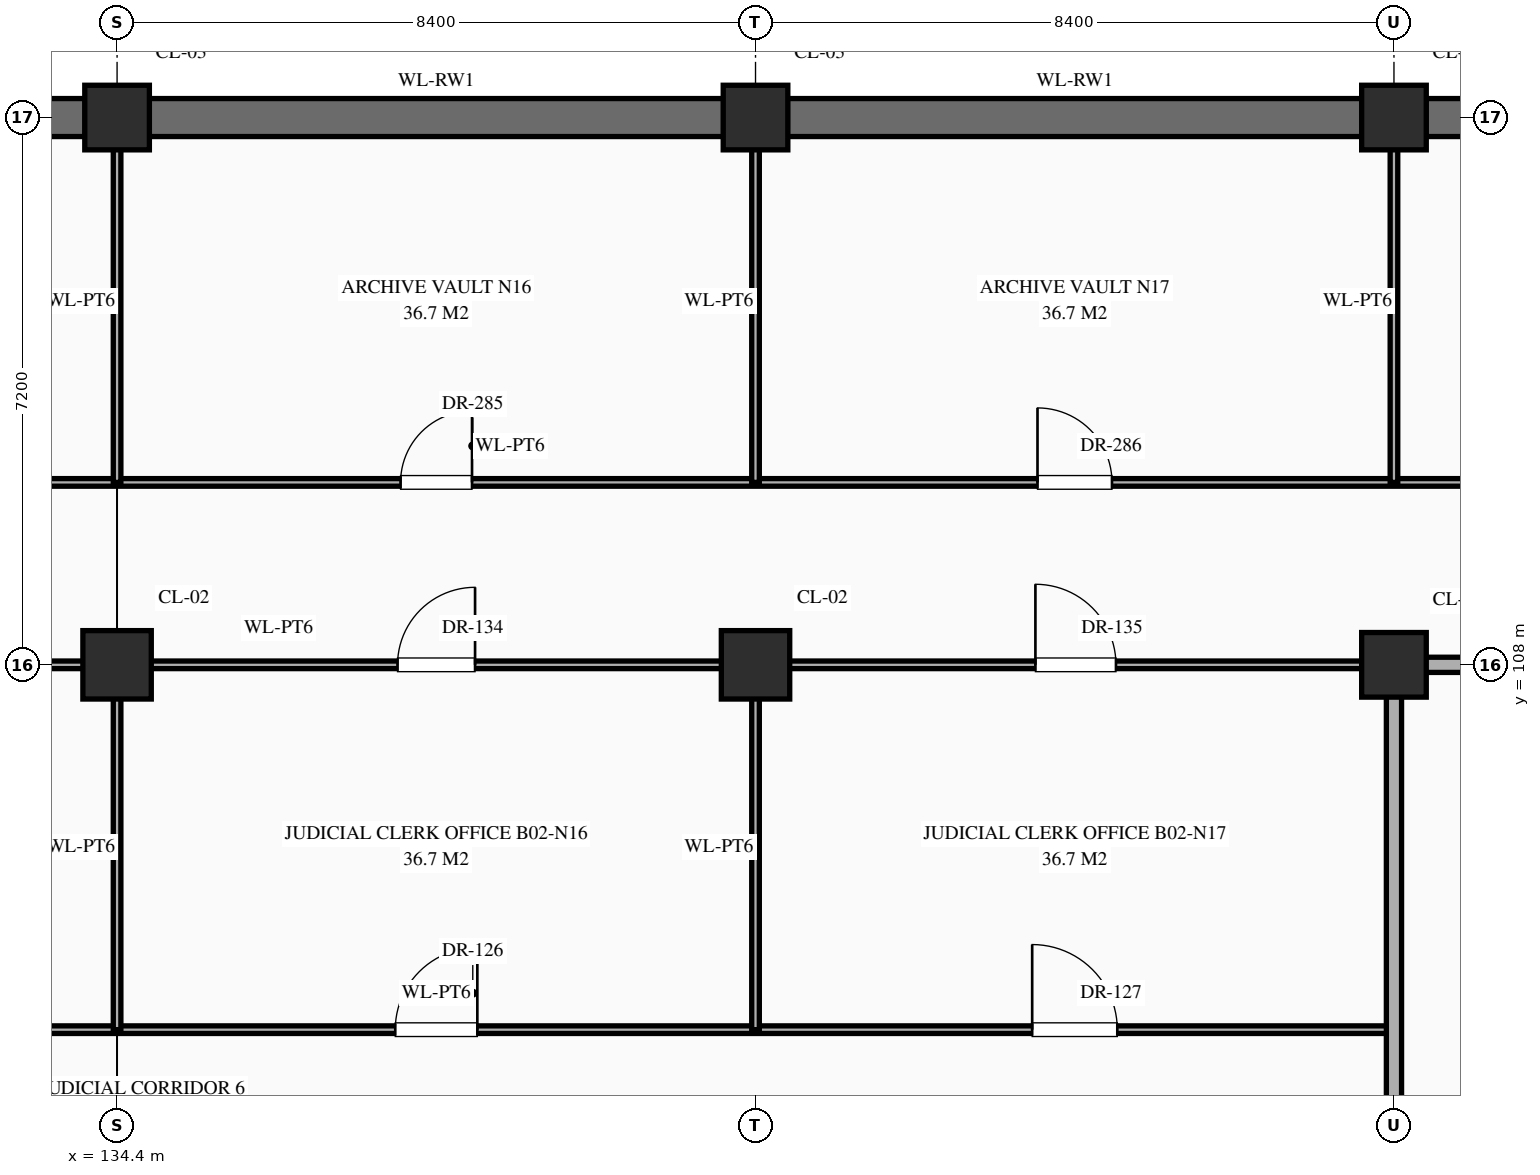
"""IFC4 building model, lengths in metres.
Left out: names, types, materials, properties, quantities, classifications, styles, units other than length and angle.
Written with IfcOpenShell. Run it as: python <this file> out.ifc"""

import sys

from ifc_helpers import new_model, si_unit, direction, frame, frame_2d, origin, origin_2d, place, context, subcontext, project, spatial, rectangle, extrude, element, fill, save


model = new_model("IFC4")
c1 = context("Model", 3, precision=1e-05, world=origin(), true_north=direction((0.0, 1.0)))
c2 = subcontext(c1, "Body", "Model", "MODEL_VIEW")
j1 = project(units=[si_unit("LENGTHUNIT", "METRE"), si_unit("PLANEANGLEUNIT", "RADIAN")], contexts=[c1])
p1 = place(None, origin())
s1 = spatial("IfcSite", under=j1, at=p1, CompositionType="ELEMENT")
p2 = place(p1, origin())
s2 = spatial("IfcBuilding", under=s1, at=p2, CompositionType="ELEMENT")
p3 = place(p2, frame((0.0, 0.0, -10.2)))
s3 = spatial("IfcBuildingStorey", under=s2, at=p3, CompositionType="ELEMENT", Elevation=-10.2)
p4 = place(p3, frame((134.4, 108.0, 0.0), z_axis=(0.0, 0.0, 1.0), x_axis=(1.0, 0.0, 0.0)))
e1 = element("IfcColumn", 1, at=p4, inside=s3, PredefinedType="COLUMN", context=c2, shape_type="SweptSolid", body=[
    extrude(rectangle(XDim=0.9, YDim=0.9, at=origin_2d()), origin(), (0.0, 0.0, 1.0), 4.8),
])
p5 = place(p3, frame((134.4, 115.2, 0.0), z_axis=(0.0, 0.0, 1.0), x_axis=(1.0, 0.0, 0.0)))
e2 = element("IfcColumn", 2, at=p5, inside=s3, PredefinedType="COLUMN", context=c2, shape_type="SweptSolid", body=[
    extrude(rectangle(XDim=0.85, YDim=0.85, at=origin_2d()), origin(), (0.0, 0.0, 1.0), 4.8),
])
p6 = place(p3, frame((142.8, 108.0, 0.0), z_axis=(0.0, 0.0, 1.0), x_axis=(1.0, 0.0, 0.0)))
e3 = element("IfcColumn", 3, at=p6, inside=s3, PredefinedType="COLUMN", context=c2, shape_type="SweptSolid", body=[
    extrude(rectangle(XDim=0.9, YDim=0.9, at=origin_2d()), origin(), (0.0, 0.0, 1.0), 4.8),
])
for number, where, z_axis, x_axis in (
    (4, (142.8, 115.2, 0.0), (0.0, 0.0, 1.0), (1.0, 0.0, 0.0)),
    (5, (151.2, 108.0, 0.0), (0.0, 0.0, 1.0), (1.0, 0.0, 0.0)),
    (6, (151.2, 115.2, 0.0), (0.0, 0.0, 1.0), (1.0, 0.0, 0.0)),
):
    element("IfcColumn", number, at=place(p3, frame(where, z_axis=z_axis, x_axis=x_axis)), inside=s3, PredefinedType="COLUMN", context=c2, shape_type="SweptSolid", body=[
        extrude(rectangle(XDim=0.85, YDim=0.85, at=origin_2d()), origin(), (0.0, 0.0, 1.0), 4.8),
    ])
p7 = place(p3, frame((126.42, 115.2, 0.0), z_axis=(0.0, 0.0, 1.0), x_axis=(1.0, 0.0, 0.0)))
e7 = element("IfcWall", 7, at=p7, inside=s3, PredefinedType="USERDEFINED", context=c2, shape_type="SweptSolid", body=[
    extrude(rectangle(XDim=7.56, YDim=0.5, at=frame_2d((3.78, 0.0))), origin(), (0.0, 0.0, 1.0), 4.48),
])
p8 = place(p3, frame((134.82, 115.2, 0.0), z_axis=(0.0, 0.0, 1.0), x_axis=(1.0, 0.0, 0.0)))
e8 = element("IfcWall", 8, at=p8, inside=s3, PredefinedType="USERDEFINED", context=c2, shape_type="SweptSolid", body=[
    extrude(rectangle(XDim=7.56, YDim=0.5, at=frame_2d((3.78, 0.0))), origin(), (0.0, 0.0, 1.0), 4.48),
])
p9 = place(p3, frame((143.22, 115.2, 0.0), z_axis=(0.0, 0.0, 1.0), x_axis=(1.0, 0.0, 0.0)))
e9 = element("IfcWall", 9, at=p9, inside=s3, PredefinedType="USERDEFINED", context=c2, shape_type="SweptSolid", body=[
    extrude(rectangle(XDim=7.56, YDim=0.5, at=frame_2d((3.78, 0.0))), origin(), (0.0, 0.0, 1.0), 4.48),
])
p10 = place(p3, frame((151.62, 115.2, 0.0), z_axis=(0.0, 0.0, 1.0), x_axis=(1.0, 0.0, 0.0)))
e10 = element("IfcWall", 10, at=p10, inside=s3, PredefinedType="USERDEFINED", context=c2, shape_type="SweptSolid", body=[
    extrude(rectangle(XDim=7.56, YDim=0.5, at=frame_2d((3.78, 0.0))), origin(), (0.0, 0.0, 1.0), 4.48),
])
p11 = place(p3, frame((126.0, 103.2, 0.0), z_axis=(0.0, 0.0, 1.0), x_axis=(1.0, 0.0, 0.0)))
e11 = element("IfcWall", 11, at=p11, inside=s3, PredefinedType="STANDARD", context=c2, shape_type="SweptSolid", body=[
    extrude(rectangle(XDim=25.2, YDim=0.1, at=frame_2d((12.6, 0.0))), origin(), (0.0, 0.0, 1.0), 4.48),
])
p12 = place(p11, frame((3.68, 0.0, 0.0)))
e12 = element("IfcOpeningElement", 12, at=p12, cuts=e11, PredefinedType="OPENING", context=c2, shape_type="SweptSolid", body=[
    extrude(rectangle(XDim=1.04, YDim=2.2, at=frame_2d((0.52, 1.1))), frame((0.0, 0.062, 0.0), z_axis=(0.0, -1.0, 0.0), x_axis=(1.0, 0.0, 0.0)), (0.0, 0.0, 1.0), 0.124),
])
p13 = place(p11, frame((12.06, 0.0, 0.0)))
e13 = element("IfcOpeningElement", 13, at=p13, cuts=e11, PredefinedType="OPENING", context=c2, shape_type="SweptSolid", body=[
    extrude(rectangle(XDim=1.08, YDim=2.25, at=frame_2d((0.54, 1.125))), frame((0.0, 0.062, 0.0), z_axis=(0.0, -1.0, 0.0), x_axis=(1.0, 0.0, 0.0)), (0.0, 0.0, 1.0), 0.124),
])
p14 = place(p11, frame((20.44, 0.0, 0.0)))
e14 = element("IfcOpeningElement", 14, at=p14, cuts=e11, PredefinedType="OPENING", context=c2, shape_type="SweptSolid", body=[
    extrude(rectangle(XDim=1.12, YDim=2.25, at=frame_2d((0.56, 1.125))), frame((0.0, 0.062, 0.0), z_axis=(0.0, -1.0, 0.0), x_axis=(1.0, 0.0, 0.0)), (0.0, 0.0, 1.0), 0.124),
])
p15 = place(p3, frame((126.0, 108.0, 0.0), z_axis=(0.0, 0.0, 1.0), x_axis=(1.0, 0.0, 0.0)))
e15 = element("IfcWall", 15, at=p15, inside=s3, PredefinedType="STANDARD", context=c2, shape_type="SweptSolid", body=[
    extrude(rectangle(XDim=25.2, YDim=0.1, at=frame_2d((12.6, 0.0))), origin(), (0.0, 0.0, 1.0), 3.63),
])
p16 = place(p15, frame((3.71, 0.0, 0.0)))
e16 = element("IfcOpeningElement", 16, at=p16, cuts=e15, PredefinedType="OPENING", context=c2, shape_type="SweptSolid", body=[
    extrude(rectangle(XDim=0.98, YDim=2.35, at=frame_2d((0.49, 1.175))), frame((0.0, 0.062, 0.0), z_axis=(0.0, -1.0, 0.0), x_axis=(1.0, 0.0, 0.0)), (0.0, 0.0, 1.0), 0.124),
])
p17 = place(p15, frame((12.09, 0.0, 0.0)))
e17 = element("IfcOpeningElement", 17, at=p17, cuts=e15, PredefinedType="OPENING", context=c2, shape_type="SweptSolid", body=[
    extrude(rectangle(XDim=1.02, YDim=2.4, at=frame_2d((0.51, 1.2))), frame((0.0, 0.062, 0.0), z_axis=(0.0, -1.0, 0.0), x_axis=(1.0, 0.0, 0.0)), (0.0, 0.0, 1.0), 0.124),
])
p18 = place(p15, frame((20.482, 0.0, 0.0)))
e18 = element("IfcOpeningElement", 18, at=p18, cuts=e15, PredefinedType="OPENING", context=c2, shape_type="SweptSolid", body=[
    extrude(rectangle(XDim=1.06, YDim=2.4, at=frame_2d((0.53, 1.2))), frame((0.0, 0.062, 0.0), z_axis=(0.0, -1.0, 0.0), x_axis=(1.0, 0.0, 0.0)), (0.0, 0.0, 1.0), 0.124),
])
p19 = place(p3, frame((151.2, 108.0, 0.0), z_axis=(0.0, 0.0, 1.0), x_axis=(1.0, 0.0, 0.0)))
e19 = element("IfcWall", 19, at=p19, inside=s3, PredefinedType="STANDARD", context=c2, shape_type="SweptSolid", body=[
    extrude(rectangle(XDim=6.6, YDim=0.2, at=frame_2d((3.3, 0.0))), origin(), (0.0, 0.0, 1.0), 3.63),
])
p20 = place(p3, frame((0.04, 110.4, 0.0), z_axis=(0.0, 0.0, 1.0), x_axis=(1.0, 0.0, 0.0)))
e20 = element("IfcWall", 20, at=p20, inside=s3, PredefinedType="STANDARD", context=c2, shape_type="SweptSolid", body=[
    extrude(rectangle(XDim=167.92, YDim=0.1, at=frame_2d((83.96, 0.0))), origin(), (0.0, 0.0, 1.0), 4.48),
])
p21 = place(p20, frame((3.54, 0.0, 0.0)))
e21 = element("IfcOpeningElement", 21, at=p21, cuts=e20, PredefinedType="OPENING", context=c2, shape_type="SweptSolid", body=[
    extrude(rectangle(XDim=1.28, YDim=2.35, at=frame_2d((0.64, 1.175))), frame((0.0, 0.062, 0.0), z_axis=(0.0, -1.0, 0.0), x_axis=(1.0, 0.0, 0.0)), (0.0, 0.0, 1.0), 0.124),
])
p22 = place(p20, frame((12.09, 0.0, 0.0)))
e22 = element("IfcOpeningElement", 22, at=p22, cuts=e20, PredefinedType="OPENING", context=c2, shape_type="SweptSolid", body=[
    extrude(rectangle(XDim=0.94, YDim=2.3, at=frame_2d((0.47, 1.15))), frame((0.0, 0.062, 0.0), z_axis=(0.0, -1.0, 0.0), x_axis=(1.0, 0.0, 0.0)), (0.0, 0.0, 1.0), 0.124),
])
p23 = place(p20, frame((20.47, 0.0, 0.0)))
e23 = element("IfcOpeningElement", 23, at=p23, cuts=e20, PredefinedType="OPENING", context=c2, shape_type="SweptSolid", body=[
    extrude(rectangle(XDim=0.98, YDim=2.35, at=frame_2d((0.49, 1.175))), frame((0.0, 0.062, 0.0), z_axis=(0.0, -1.0, 0.0), x_axis=(1.0, 0.0, 0.0)), (0.0, 0.0, 1.0), 0.124),
])
p24 = place(p20, frame((28.85, 0.0, 0.0)))
e24 = element("IfcOpeningElement", 24, at=p24, cuts=e20, PredefinedType="OPENING", context=c2, shape_type="SweptSolid", body=[
    extrude(rectangle(XDim=1.02, YDim=2.4, at=frame_2d((0.51, 1.2))), frame((0.0, 0.062, 0.0), z_axis=(0.0, -1.0, 0.0), x_axis=(1.0, 0.0, 0.0)), (0.0, 0.0, 1.0), 0.124),
])
p25 = place(p20, frame((37.23, 0.0, 0.0)))
e25 = element("IfcOpeningElement", 25, at=p25, cuts=e20, PredefinedType="OPENING", context=c2, shape_type="SweptSolid", body=[
    extrude(rectangle(XDim=1.06, YDim=2.4, at=frame_2d((0.53, 1.2))), frame((0.0, 0.062, 0.0), z_axis=(0.0, -1.0, 0.0), x_axis=(1.0, 0.0, 0.0)), (0.0, 0.0, 1.0), 0.124),
])
p26 = place(p20, frame((45.59, 0.0, 0.0)))
e26 = element("IfcOpeningElement", 26, at=p26, cuts=e20, PredefinedType="OPENING", context=c2, shape_type="SweptSolid", body=[
    extrude(rectangle(XDim=1.14, YDim=2.4, at=frame_2d((0.57, 1.2))), frame((0.0, 0.062, 0.0), z_axis=(0.0, -1.0, 0.0), x_axis=(1.0, 0.0, 0.0)), (0.0, 0.0, 1.0), 0.124),
])
p27 = place(p20, frame((54.13, 0.0, 0.0)))
e27 = element("IfcOpeningElement", 27, at=p27, cuts=e20, PredefinedType="OPENING", context=c2, shape_type="SweptSolid", body=[
    extrude(rectangle(XDim=0.86, YDim=2.1, at=frame_2d((0.43, 1.05))), frame((0.0, 0.062, 0.0), z_axis=(0.0, -1.0, 0.0), x_axis=(1.0, 0.0, 0.0)), (0.0, 0.0, 1.0), 0.124),
])
p28 = place(p20, frame((62.5, 0.0, 0.0)))
e28 = element("IfcOpeningElement", 28, at=p28, cuts=e20, PredefinedType="OPENING", context=c2, shape_type="SweptSolid", body=[
    extrude(rectangle(XDim=0.92, YDim=2.15, at=frame_2d((0.46, 1.075))), frame((0.0, 0.062, 0.0), z_axis=(0.0, -1.0, 0.0), x_axis=(1.0, 0.0, 0.0)), (0.0, 0.0, 1.0), 0.124),
])
p29 = place(p20, frame((70.88, 0.0, 0.0)))
e29 = element("IfcOpeningElement", 29, at=p29, cuts=e20, PredefinedType="OPENING", context=c2, shape_type="SweptSolid", body=[
    extrude(rectangle(XDim=0.96, YDim=2.2, at=frame_2d((0.48, 1.1))), frame((0.0, 0.062, 0.0), z_axis=(0.0, -1.0, 0.0), x_axis=(1.0, 0.0, 0.0)), (0.0, 0.0, 1.0), 0.124),
])
p30 = place(p20, frame((79.26, 0.0, 0.0)))
e30 = element("IfcOpeningElement", 30, at=p30, cuts=e20, PredefinedType="OPENING", context=c2, shape_type="SweptSolid", body=[
    extrude(rectangle(XDim=1.0, YDim=2.25, at=frame_2d((0.5, 1.125))), frame((0.0, 0.062, 0.0), z_axis=(0.0, -1.0, 0.0), x_axis=(1.0, 0.0, 0.0)), (0.0, 0.0, 1.0), 0.124),
])
p31 = place(p20, frame((87.62, 0.0, 0.0)))
e31 = element("IfcOpeningElement", 31, at=p31, cuts=e20, PredefinedType="OPENING", context=c2, shape_type="SweptSolid", body=[
    extrude(rectangle(XDim=1.08, YDim=2.25, at=frame_2d((0.54, 1.125))), frame((0.0, 0.062, 0.0), z_axis=(0.0, -1.0, 0.0), x_axis=(1.0, 0.0, 0.0)), (0.0, 0.0, 1.0), 0.124),
])
p32 = place(p20, frame((96.0, 0.0, 0.0)))
e32 = element("IfcOpeningElement", 32, at=p32, cuts=e20, PredefinedType="OPENING", context=c2, shape_type="SweptSolid", body=[
    extrude(rectangle(XDim=1.12, YDim=2.25, at=frame_2d((0.56, 1.125))), frame((0.0, 0.062, 0.0), z_axis=(0.0, -1.0, 0.0), x_axis=(1.0, 0.0, 0.0)), (0.0, 0.0, 1.0), 0.124),
])
p33 = place(p20, frame((104.38, 0.0, 0.0)))
e33 = element("IfcOpeningElement", 33, at=p33, cuts=e20, PredefinedType="OPENING", context=c2, shape_type="SweptSolid", body=[
    extrude(rectangle(XDim=1.16, YDim=2.3, at=frame_2d((0.58, 1.15))), frame((0.0, 0.062, 0.0), z_axis=(0.0, -1.0, 0.0), x_axis=(1.0, 0.0, 0.0)), (0.0, 0.0, 1.0), 0.124),
])
p34 = place(p20, frame((112.76, 0.0, 0.0)))
e34 = element("IfcOpeningElement", 34, at=p34, cuts=e20, PredefinedType="OPENING", context=c2, shape_type="SweptSolid", body=[
    extrude(rectangle(XDim=1.2, YDim=2.35, at=frame_2d((0.6, 1.175))), frame((0.0, 0.062, 0.0), z_axis=(0.0, -1.0, 0.0), x_axis=(1.0, 0.0, 0.0)), (0.0, 0.0, 1.0), 0.124),
])
p35 = place(p20, frame((121.14, 0.0, 0.0)))
e35 = element("IfcOpeningElement", 35, at=p35, cuts=e20, PredefinedType="OPENING", context=c2, shape_type="SweptSolid", body=[
    extrude(rectangle(XDim=1.24, YDim=2.3, at=frame_2d((0.62, 1.15))), frame((0.0, 0.062, 0.0), z_axis=(0.0, -1.0, 0.0), x_axis=(1.0, 0.0, 0.0)), (0.0, 0.0, 1.0), 0.124),
])
p36 = place(p20, frame((129.52, 0.0, 0.0)))
e36 = element("IfcOpeningElement", 36, at=p36, cuts=e20, PredefinedType="OPENING", context=c2, shape_type="SweptSolid", body=[
    extrude(rectangle(XDim=1.28, YDim=2.35, at=frame_2d((0.64, 1.175))), frame((0.0, 0.062, 0.0), z_axis=(0.0, -1.0, 0.0), x_axis=(1.0, 0.0, 0.0)), (0.0, 0.0, 1.0), 0.124),
])
p37 = place(p20, frame((138.09, 0.0, 0.0)))
e37 = element("IfcOpeningElement", 37, at=p37, cuts=e20, PredefinedType="OPENING", context=c2, shape_type="SweptSolid", body=[
    extrude(rectangle(XDim=0.94, YDim=2.3, at=frame_2d((0.47, 1.15))), frame((0.0, 0.062, 0.0), z_axis=(0.0, -1.0, 0.0), x_axis=(1.0, 0.0, 0.0)), (0.0, 0.0, 1.0), 0.124),
])
p38 = place(p20, frame((146.47, 0.0, 0.0)))
e38 = element("IfcOpeningElement", 38, at=p38, cuts=e20, PredefinedType="OPENING", context=c2, shape_type="SweptSolid", body=[
    extrude(rectangle(XDim=0.98, YDim=2.35, at=frame_2d((0.49, 1.175))), frame((0.0, 0.062, 0.0), z_axis=(0.0, -1.0, 0.0), x_axis=(1.0, 0.0, 0.0)), (0.0, 0.0, 1.0), 0.124),
])
p39 = place(p20, frame((154.85, 0.0, 0.0)))
e39 = element("IfcOpeningElement", 39, at=p39, cuts=e20, PredefinedType="OPENING", context=c2, shape_type="SweptSolid", body=[
    extrude(rectangle(XDim=1.02, YDim=2.4, at=frame_2d((0.51, 1.2))), frame((0.0, 0.062, 0.0), z_axis=(0.0, -1.0, 0.0), x_axis=(1.0, 0.0, 0.0)), (0.0, 0.0, 1.0), 0.124),
])
p40 = place(p20, frame((163.21, 0.0, 0.0)))
e40 = element("IfcOpeningElement", 40, at=p40, cuts=e20, PredefinedType="OPENING", context=c2, shape_type="SweptSolid", body=[
    extrude(rectangle(XDim=1.06, YDim=2.4, at=frame_2d((0.53, 1.2))), frame((0.0, 0.062, 0.0), z_axis=(0.0, -1.0, 0.0), x_axis=(1.0, 0.0, 0.0)), (0.0, 0.0, 1.0), 0.124),
])
p41 = place(p3, frame((134.4, 103.2, 0.0), z_axis=(0.0, 0.0, 1.0), x_axis=(0.0, 1.0, 0.0)))
e41 = element("IfcWall", 41, at=p41, inside=s3, PredefinedType="STANDARD", context=c2, shape_type="SweptSolid", body=[
    extrude(rectangle(XDim=4.8, YDim=0.1, at=frame_2d((2.4, 0.0))), origin(), (0.0, 0.0, 1.0), 3.73),
])
p42 = place(p3, frame((134.4, 110.4, 0.0), z_axis=(0.0, 0.0, 1.0), x_axis=(0.0, 1.0, 0.0)))
e42 = element("IfcWall", 42, at=p42, inside=s3, PredefinedType="STANDARD", context=c2, shape_type="SweptSolid", body=[
    extrude(rectangle(XDim=4.76, YDim=0.1, at=frame_2d((2.38, 0.0))), origin(), (0.0, 0.0, 1.0), 3.73),
])
p43 = place(p3, frame((142.8, 103.2, 0.0), z_axis=(0.0, 0.0, 1.0), x_axis=(0.0, 1.0, 0.0)))
e43 = element("IfcWall", 43, at=p43, inside=s3, PredefinedType="STANDARD", context=c2, shape_type="SweptSolid", body=[
    extrude(rectangle(XDim=4.8, YDim=0.1, at=frame_2d((2.4, 0.0))), origin(), (0.0, 0.0, 1.0), 3.73),
])
p44 = place(p3, frame((142.8, 110.4, 0.0), z_axis=(0.0, 0.0, 1.0), x_axis=(0.0, 1.0, 0.0)))
e44 = element("IfcWall", 44, at=p44, inside=s3, PredefinedType="STANDARD", context=c2, shape_type="SweptSolid", body=[
    extrude(rectangle(XDim=4.76, YDim=0.1, at=frame_2d((2.38, 0.0))), origin(), (0.0, 0.0, 1.0), 3.73),
])
p45 = place(p3, frame((151.2, 91.2, 0.0), z_axis=(0.0, 0.0, 1.0), x_axis=(0.0, 1.0, 0.0)))
e45 = element("IfcWall", 45, at=p45, inside=s3, PredefinedType="STANDARD", context=c2, shape_type="SweptSolid", body=[
    extrude(rectangle(XDim=16.8, YDim=0.2, at=frame_2d((8.4, 0.0))), origin(), (0.0, 0.0, 1.0), 3.73),
])
p46 = place(p3, frame((151.2, 110.4, 0.0), z_axis=(0.0, 0.0, 1.0), x_axis=(0.0, 1.0, 0.0)))
e46 = element("IfcWall", 46, at=p46, inside=s3, PredefinedType="STANDARD", context=c2, shape_type="SweptSolid", body=[
    extrude(rectangle(XDim=4.76, YDim=0.1, at=frame_2d((2.38, 0.0))), origin(), (0.0, 0.0, 1.0), 3.73),
])
p47 = place(p13, origin())
e47 = element("IfcDoor", 47, at=p47, inside=s3, OperationType="SINGLE_SWING_RIGHT", PredefinedType="DOOR", context=c2, shape_type="SweptSolid", body=[
    extrude(rectangle(XDim=1.08, YDim=2.25, at=frame_2d((0.54, 1.125))), frame((0.0, 0.025, 0.0), z_axis=(0.0, -1.0, 0.0), x_axis=(1.0, 0.0, 0.0)), (0.0, 0.0, 1.0), 0.05),
])
fill(e13, e47)
p48 = place(p14, origin())
e48 = element("IfcDoor", 48, at=p48, inside=s3, OperationType="SINGLE_SWING_LEFT", PredefinedType="DOOR", context=c2, shape_type="SweptSolid", body=[
    extrude(rectangle(XDim=1.12, YDim=2.25, at=frame_2d((0.56, 1.125))), frame((0.0, 0.025, 0.0), z_axis=(0.0, -1.0, 0.0), x_axis=(1.0, 0.0, 0.0)), (0.0, 0.0, 1.0), 0.05),
])
fill(e14, e48)
p49 = place(p17, origin())
e49 = element("IfcDoor", 49, at=p49, inside=s3, OperationType="SINGLE_SWING_RIGHT", PredefinedType="DOOR", context=c2, shape_type="SweptSolid", body=[
    extrude(rectangle(XDim=1.02, YDim=2.4, at=frame_2d((0.51, 1.2))), frame((0.0, 0.025, 0.0), z_axis=(0.0, -1.0, 0.0), x_axis=(1.0, 0.0, 0.0)), (0.0, 0.0, 1.0), 0.05),
])
fill(e17, e49)
p50 = place(p18, origin())
e50 = element("IfcDoor", 50, at=p50, inside=s3, OperationType="SINGLE_SWING_LEFT", PredefinedType="DOOR", context=c2, shape_type="SweptSolid", body=[
    extrude(rectangle(XDim=1.06, YDim=2.4, at=frame_2d((0.53, 1.2))), frame((0.0, 0.025, 0.0), z_axis=(0.0, -1.0, 0.0), x_axis=(1.0, 0.0, 0.0)), (0.0, 0.0, 1.0), 0.05),
])
fill(e18, e50)
p51 = place(p37, origin())
e51 = element("IfcDoor", 51, at=p51, inside=s3, OperationType="SINGLE_SWING_RIGHT", PredefinedType="DOOR", context=c2, shape_type="SweptSolid", body=[
    extrude(rectangle(XDim=0.94, YDim=2.3, at=frame_2d((0.47, 1.15))), frame((0.0, 0.025, 0.0), z_axis=(0.0, -1.0, 0.0), x_axis=(1.0, 0.0, 0.0)), (0.0, 0.0, 1.0), 0.05),
])
fill(e37, e51)
p52 = place(p38, origin())
e52 = element("IfcDoor", 52, at=p52, inside=s3, OperationType="SINGLE_SWING_LEFT", PredefinedType="DOOR", context=c2, shape_type="SweptSolid", body=[
    extrude(rectangle(XDim=0.98, YDim=2.35, at=frame_2d((0.49, 1.175))), frame((0.0, 0.025, 0.0), z_axis=(0.0, -1.0, 0.0), x_axis=(1.0, 0.0, 0.0)), (0.0, 0.0, 1.0), 0.05),
])
fill(e38, e52)
save(model, sys.argv[1])
